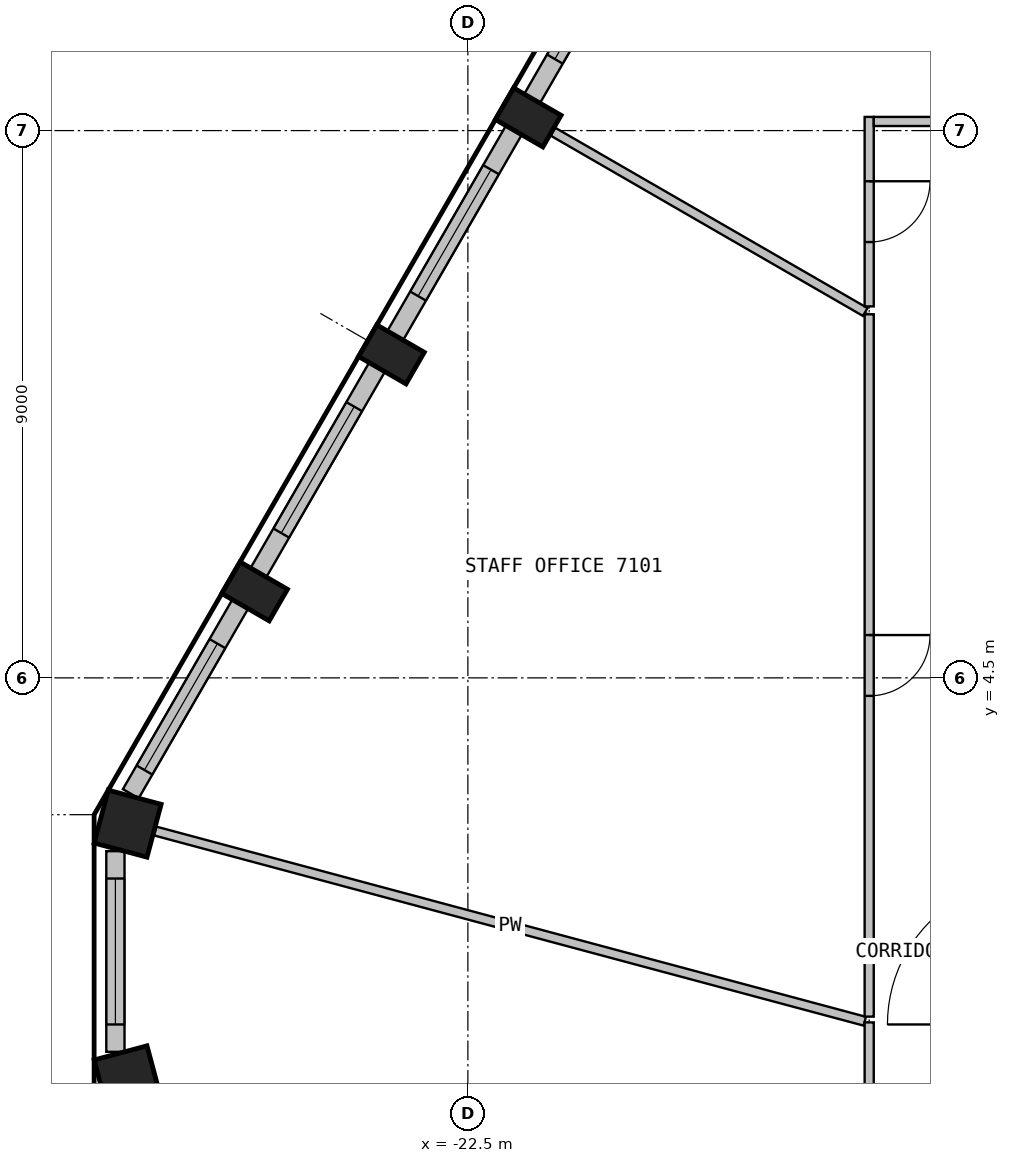
"""IFC4 building model, lengths in metres.
Left out: names, types, materials, properties, quantities, classifications, styles, units other than length and angle.
Written with IfcOpenShell. Run it as: python <this file> out.ifc"""

import sys

from ifc_helpers import new_model, si_unit, direction, frame, frame_2d, origin, origin_2d, place, context, subcontext, project, spatial, rectangle, extrude, element, fill, save


model = new_model("IFC4")
c1 = context("Model", 3, precision=1e-05, world=origin(), true_north=direction((0.0, 1.0)))
c2 = subcontext(c1, "Body", "Model", "MODEL_VIEW")
j1 = project(units=[si_unit("LENGTHUNIT", "METRE"), si_unit("PLANEANGLEUNIT", "RADIAN")], contexts=[c1])
p1 = place(None, origin())
s1 = spatial("IfcSite", under=j1, at=p1, CompositionType="ELEMENT")
p2 = place(p1, origin())
s2 = spatial("IfcBuilding", under=s1, at=p2, CompositionType="ELEMENT")
p3 = place(p2, frame((0.0, 0.0, 286.5)))
s3 = spatial("IfcBuildingStorey", under=s2, at=p3, CompositionType="ELEMENT", Elevation=286.5)
for number, where, z_axis, x_axis in (
    (1, (-21.507, 13.716, 0.0), (0.0, 0.0, 1.0), (-0.5, -0.866, 0.0)),
    (2, (-23.757, 9.819, 0.0), (0.0, 0.0, 1.0), (-0.5, -0.866, 0.0)),
    (3, (-26.007, 5.922, 0.0), (0.0, 0.0, 1.0), (-0.5, -0.866, 0.0)),
):
    element("IfcColumn", number, at=place(p3, frame(where, z_axis=z_axis, x_axis=x_axis)), inside=s3, PredefinedType="COLUMN", context=c2, shape_type="SweptSolid", body=[
        extrude(rectangle(XDim=0.6, YDim=0.9, at=origin_2d()), origin(), (0.0, 0.0, 1.0), 3.575),
    ])
for number, where, z_axis, x_axis in (
    (4, (-28.096, 2.102, 0.0), (0.0, 0.0, 1.0), (-0.259, -0.966, 0.0)),
    (5, (-28.096, -2.102, 0.0), (0.0, 0.0, 1.0), (0.259, -0.966, 0.0)),
):
    element("IfcColumn", number, at=place(p3, frame(where, z_axis=z_axis, x_axis=x_axis)), inside=s3, PredefinedType="COLUMN", context=c2, shape_type="SweptSolid", body=[
        extrude(rectangle(XDim=0.9, YDim=0.9, at=origin_2d()), origin(), (0.0, 0.0, 1.0), 3.575),
    ])
p4 = place(p3, frame((-19.644, 17.144, 0.0), z_axis=(0.0, 0.0, 1.0), x_axis=(-0.50001992892, -0.866013897511, 0.0)))
e6 = element("IfcWall", 6, at=p4, inside=s3, PredefinedType="SOLIDWALL", context=c2, shape_type="SweptSolid", body=[
    extrude(rectangle(XDim=3.599, YDim=0.3, at=frame_2d((1.8, 0.0))), origin(), (0.0, 0.0, 1.0), 3.575),
])
p5 = place(p4, frame((0.45, 0.0, 0.9)))
e7 = element("IfcOpeningElement", 7, at=p5, cuts=e6, PredefinedType="OPENING", context=c2, shape_type="SweptSolid", body=[
    extrude(rectangle(XDim=2.4, YDim=2.1, at=frame_2d((1.2, 1.05))), frame((0.0, 0.16, 0.0), z_axis=(0.0, -1.0, 0.0), x_axis=(1.0, 0.0, 0.0)), (0.0, 0.0, 1.0), 0.32),
])
p6 = place(p3, frame((-21.744, 13.506, 0.0), z_axis=(0.0, 0.0, 1.0), x_axis=(-0.499984428715, -0.866034393683, 0.0)))
e8 = element("IfcWall", 8, at=p6, inside=s3, PredefinedType="SOLIDWALL", context=c2, shape_type="SweptSolid", body=[
    extrude(rectangle(XDim=3.899, YDim=0.3, at=frame_2d((1.949, 0.0))), origin(), (0.0, 0.0, 1.0), 3.575),
])
p7 = place(p6, frame((0.75, 0.0, 0.9)))
e9 = element("IfcOpeningElement", 9, at=p7, cuts=e8, PredefinedType="OPENING", context=c2, shape_type="SweptSolid", body=[
    extrude(rectangle(XDim=2.4, YDim=2.1, at=frame_2d((1.2, 1.05))), frame((0.0, 0.16, 0.0), z_axis=(0.0, -1.0, 0.0), x_axis=(1.0, 0.0, 0.0)), (0.0, 0.0, 1.0), 0.32),
])
p8 = place(p3, frame((-23.994, 9.609, 0.0), z_axis=(0.0, 0.0, 1.0), x_axis=(-0.500011542666, -0.866018739521, 0.0)))
e10 = element("IfcWall", 10, at=p8, inside=s3, PredefinedType="SOLIDWALL", context=c2, shape_type="SweptSolid", body=[
    extrude(rectangle(XDim=3.899, YDim=0.3, at=frame_2d((1.949, 0.0))), origin(), (0.0, 0.0, 1.0), 3.575),
])
p9 = place(p8, frame((0.75, 0.0, 0.9)))
e11 = element("IfcOpeningElement", 11, at=p9, cuts=e10, PredefinedType="OPENING", context=c2, shape_type="SweptSolid", body=[
    extrude(rectangle(XDim=2.4, YDim=2.1, at=frame_2d((1.2, 1.05))), frame((0.0, 0.16, 0.0), z_axis=(0.0, -1.0, 0.0), x_axis=(1.0, 0.0, 0.0)), (0.0, 0.0, 1.0), 0.32),
])
p10 = place(p3, frame((-26.244, 5.712, 0.0), z_axis=(0.0, 0.0, 1.0), x_axis=(-0.499969057507, -0.866043267704, 0.0)))
e12 = element("IfcWall", 12, at=p10, inside=s3, PredefinedType="SOLIDWALL", context=c2, shape_type="SweptSolid", body=[
    extrude(rectangle(XDim=3.599, YDim=0.3, at=frame_2d((1.8, 0.0))), origin(), (0.0, 0.0, 1.0), 3.575),
])
p11 = place(p10, frame((0.75, 0.0, 0.9)))
e13 = element("IfcOpeningElement", 13, at=p11, cuts=e12, PredefinedType="OPENING", context=c2, shape_type="SweptSolid", body=[
    extrude(rectangle(XDim=2.4, YDim=2.1, at=frame_2d((1.2, 1.05))), frame((0.0, 0.16, 0.0), z_axis=(0.0, -1.0, 0.0), x_axis=(1.0, 0.0, 0.0)), (0.0, 0.0, 1.0), 0.32),
])
p12 = place(p3, frame((-28.297, 1.65, 0.0), z_axis=(0.0, 0.0, 1.0), x_axis=(0.0, -1.0, 0.0)))
e14 = element("IfcWall", 14, at=p12, inside=s3, PredefinedType="SOLIDWALL", context=c2, shape_type="SweptSolid", body=[
    extrude(rectangle(XDim=3.3, YDim=0.3, at=frame_2d((1.65, 0.0))), origin(), (0.0, 0.0, 1.0), 3.575),
])
p13 = place(p12, frame((0.45, 0.0, 0.9)))
e15 = element("IfcOpeningElement", 15, at=p13, cuts=e14, PredefinedType="OPENING", context=c2, shape_type="SweptSolid", body=[
    extrude(rectangle(XDim=2.4, YDim=2.1, at=frame_2d((1.2, 1.05))), frame((0.0, 0.16, 0.0), z_axis=(0.0, -1.0, 0.0), x_axis=(1.0, 0.0, 0.0)), (0.0, 0.0, 1.0), 0.32),
])
p14 = place(p3, frame((-27.642, 1.981, 0.0), z_axis=(0.0, 0.0, 1.0), x_axis=(0.965912869078, -0.258867397232, 0.0)))
e16 = element("IfcWall", 16, at=p14, inside=s3, PredefinedType="PARTITIONING", context=c2, shape_type="SweptSolid", body=[
    extrude(rectangle(XDim=12.081, YDim=0.15, at=frame_2d((6.041, 0.0))), origin(), (0.0, 0.0, 1.0), 3.575),
])
p15 = place(p3, frame((-21.1, 13.481, 0.0), z_axis=(0.0, 0.0, 1.0), x_axis=(0.866042974482, -0.499969565424, 0.0)))
e17 = element("IfcWall", 17, at=p15, inside=s3, PredefinedType="PARTITIONING", context=c2, shape_type="SweptSolid", body=[
    extrude(rectangle(XDim=5.929, YDim=0.15, at=frame_2d((2.965, 0.0))), origin(), (0.0, 0.0, 1.0), 3.575),
])
p16 = place(p3, frame((-15.9, -1.166, 0.0), z_axis=(0.0, 0.0, 1.0), x_axis=(0.0, -1.0, 0.0)))
e18 = element("IfcWall", 18, at=p16, inside=s3, PredefinedType="PARTITIONING", context=c2, shape_type="SweptSolid", body=[
    extrude(rectangle(XDim=4.117, YDim=0.15, at=frame_2d((2.059, 0.0))), origin(), (0.0, 0.0, 1.0), 3.575),
])
p17 = place(p16, frame((1.559, 0.0, 0.0)))
e19 = element("IfcOpeningElement", 19, at=p17, cuts=e18, PredefinedType="OPENING", context=c2, shape_type="SweptSolid", body=[
    extrude(rectangle(XDim=1.0, YDim=2.1, at=frame_2d((0.5, 1.05))), frame((0.0, 0.085, 0.0), z_axis=(0.0, -1.0, 0.0), x_axis=(1.0, 0.0, 0.0)), (0.0, 0.0, 1.0), 0.17),
])
p18 = place(p3, frame((-15.9, 10.479, 0.0), z_axis=(0.0, 0.0, 1.0), x_axis=(0.0, -1.0, 0.0)))
e20 = element("IfcWall", 20, at=p18, inside=s3, PredefinedType="PARTITIONING", context=c2, shape_type="SweptSolid", body=[
    extrude(rectangle(XDim=11.55, YDim=0.15, at=frame_2d((5.775, 0.0))), origin(), (0.0, 0.0, 1.0), 3.575),
])
p19 = place(p18, frame((5.275, 0.0, 0.0)))
e21 = element("IfcOpeningElement", 21, at=p19, cuts=e20, PredefinedType="OPENING", context=c2, shape_type="SweptSolid", body=[
    extrude(rectangle(XDim=1.0, YDim=2.1, at=frame_2d((0.5, 1.05))), frame((0.0, 0.085, 0.0), z_axis=(0.0, -1.0, 0.0), x_axis=(1.0, 0.0, 0.0)), (0.0, 0.0, 1.0), 0.17),
])
p20 = place(p3, frame((-15.9, 13.725, 0.0), z_axis=(0.0, 0.0, 1.0), x_axis=(0.0, -1.0, 0.0)))
e22 = element("IfcWall", 22, at=p20, inside=s3, PredefinedType="PARTITIONING", context=c2, shape_type="SweptSolid", body=[
    extrude(rectangle(XDim=3.116, YDim=0.15, at=frame_2d((1.558, 0.0))), origin(), (0.0, 0.0, 1.0), 3.575),
])
p21 = place(p20, frame((1.058, 0.0, 0.0)))
e23 = element("IfcOpeningElement", 23, at=p21, cuts=e22, PredefinedType="OPENING", context=c2, shape_type="SweptSolid", body=[
    extrude(rectangle(XDim=1.0, YDim=2.1, at=frame_2d((0.5, 1.05))), frame((0.0, 0.085, 0.0), z_axis=(0.0, -1.0, 0.0), x_axis=(1.0, 0.0, 0.0)), (0.0, 0.0, 1.0), 0.17),
])
p22 = place(p3, frame((-14.12, 13.65, 0.0), z_axis=(0.0, 0.0, 1.0), x_axis=(-1.0, 0.0, 0.0)))
e24 = element("IfcWall", 24, at=p22, inside=s3, PredefinedType="PARTITIONING", context=c2, shape_type="SweptSolid", body=[
    extrude(rectangle(XDim=1.705, YDim=0.15, at=frame_2d((0.853, 0.0))), origin(), (0.0, 0.0, 1.0), 3.575),
])
p23 = place(p3, frame((-15.481, 19.083, 0.0), z_axis=(0.0, 0.0, 1.0), x_axis=(0.25887533963, -0.965910740458, 0.0)))
e25 = element("IfcWall", 25, at=p23, inside=s3, PredefinedType="PARTITIONING", context=c2, shape_type="SweptSolid", body=[
    extrude(rectangle(XDim=5.55, YDim=0.15, at=frame_2d((2.775, 0.0))), origin(), (0.0, 0.0, 1.0), 3.575),
])
p24 = place(p5, origin())
e26 = element("IfcWindow", 26, at=p24, inside=s3, PartitioningType="SINGLE_PANEL", PredefinedType="WINDOW", context=c2, shape_type="SweptSolid", body=[
    extrude(rectangle(XDim=2.4, YDim=2.1, at=frame_2d((1.2, 1.05))), frame((0.0, 0.03, 0.0), z_axis=(0.0, -1.0, 0.0), x_axis=(1.0, 0.0, 0.0)), (0.0, 0.0, 1.0), 0.06),
])
fill(e7, e26)
p25 = place(p7, origin())
e27 = element("IfcWindow", 27, at=p25, inside=s3, PartitioningType="SINGLE_PANEL", PredefinedType="WINDOW", context=c2, shape_type="SweptSolid", body=[
    extrude(rectangle(XDim=2.4, YDim=2.1, at=frame_2d((1.2, 1.05))), frame((0.0, 0.03, 0.0), z_axis=(0.0, -1.0, 0.0), x_axis=(1.0, 0.0, 0.0)), (0.0, 0.0, 1.0), 0.06),
])
fill(e9, e27)
p26 = place(p9, origin())
e28 = element("IfcWindow", 28, at=p26, inside=s3, PartitioningType="SINGLE_PANEL", PredefinedType="WINDOW", context=c2, shape_type="SweptSolid", body=[
    extrude(rectangle(XDim=2.4, YDim=2.1, at=frame_2d((1.2, 1.05))), frame((0.0, 0.03, 0.0), z_axis=(0.0, -1.0, 0.0), x_axis=(1.0, 0.0, 0.0)), (0.0, 0.0, 1.0), 0.06),
])
fill(e11, e28)
p27 = place(p11, origin())
e29 = element("IfcWindow", 29, at=p27, inside=s3, PartitioningType="SINGLE_PANEL", PredefinedType="WINDOW", context=c2, shape_type="SweptSolid", body=[
    extrude(rectangle(XDim=2.4, YDim=2.1, at=frame_2d((1.2, 1.05))), frame((0.0, 0.03, 0.0), z_axis=(0.0, -1.0, 0.0), x_axis=(1.0, 0.0, 0.0)), (0.0, 0.0, 1.0), 0.06),
])
fill(e13, e29)
p28 = place(p13, origin())
e30 = element("IfcWindow", 30, at=p28, inside=s3, PartitioningType="SINGLE_PANEL", PredefinedType="WINDOW", context=c2, shape_type="SweptSolid", body=[
    extrude(rectangle(XDim=2.4, YDim=2.1, at=frame_2d((1.2, 1.05))), frame((0.0, 0.03, 0.0), z_axis=(0.0, -1.0, 0.0), x_axis=(1.0, 0.0, 0.0)), (0.0, 0.0, 1.0), 0.06),
])
fill(e15, e30)
p29 = place(p19, origin())
e31 = element("IfcDoor", 31, at=p29, inside=s3, OperationType="SINGLE_SWING_RIGHT", PredefinedType="DOOR", context=c2, shape_type="SweptSolid", body=[
    extrude(rectangle(XDim=1.0, YDim=2.1, at=frame_2d((0.5, 1.05))), frame((0.0, 0.025, 0.0), z_axis=(0.0, -1.0, 0.0), x_axis=(1.0, 0.0, 0.0)), (0.0, 0.0, 1.0), 0.05),
])
fill(e21, e31)
p30 = place(p21, origin())
e32 = element("IfcDoor", 32, at=p30, inside=s3, OperationType="SINGLE_SWING_LEFT", PredefinedType="DOOR", context=c2, shape_type="SweptSolid", body=[
    extrude(rectangle(XDim=1.0, YDim=2.1, at=frame_2d((0.5, 1.05))), frame((0.0, 0.025, 0.0), z_axis=(0.0, -1.0, 0.0), x_axis=(1.0, 0.0, 0.0)), (0.0, 0.0, 1.0), 0.05),
])
fill(e23, e32)
save(model, sys.argv[1])
